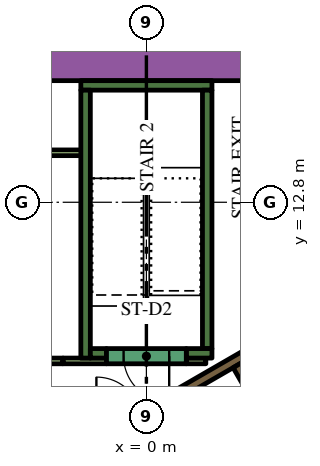
"""IFC4 building model, lengths in metres.
Left out: names, types, materials, properties, quantities, classifications, styles, units other than length and angle.
Written with IfcOpenShell. Run it as: python <this file> out.ifc"""

import sys

from ifc_helpers import new_model, si_unit, direction, frame, frame_2d, origin, place, context, subcontext, project, spatial, rectangle, extrude, element, fill, save


model = new_model("IFC4")
c1 = context("Model", 3, precision=1e-05, world=origin(), true_north=direction((0.0, 1.0)))
c2 = subcontext(c1, "Body", "Model", "MODEL_VIEW")
j1 = project(units=[si_unit("LENGTHUNIT", "METRE"), si_unit("PLANEANGLEUNIT", "RADIAN")], contexts=[c1])
p1 = place(None, origin())
s1 = spatial("IfcSite", under=j1, at=p1, CompositionType="ELEMENT")
p2 = place(p1, origin())
s2 = spatial("IfcBuilding", under=s1, at=p2, CompositionType="ELEMENT")
p3 = place(p2, frame((0.0, 0.0, 87.6)))
s3 = spatial("IfcBuildingStorey", under=s2, at=p3, CompositionType="ELEMENT", Elevation=87.6)
p4 = place(p3, frame((-4.224, 16.45, 0.0), z_axis=(0.0, 0.0, 1.0), x_axis=(1.0, 0.0, 0.0)))
e1 = element("IfcWall", 1, at=p4, inside=s3, PredefinedType="SOLIDWALL", context=c2, shape_type="SweptSolid", body=[
    extrude(rectangle(XDim=9.488, YDim=0.9, at=frame_2d((4.744, 0.0))), origin(), (0.0, 0.0, 1.0), 3.9),
])
p5 = place(p3, frame((-1.725, 15.875, 0.0), z_axis=(0.0, 0.0, 1.0), x_axis=(1.0, 0.0, 0.0)))
e2 = element("IfcWall", 2, at=p5, inside=s3, PredefinedType="SOLIDWALL", context=c2, shape_type="SweptSolid", body=[
    extrude(rectangle(XDim=3.45, YDim=0.25, at=frame_2d((1.725, 0.0))), origin(), (0.0, 0.0, 1.0), 3.9),
])
p6 = place(p3, frame((1.6, 8.95, 0.0), z_axis=(0.0, 0.0, 1.0), x_axis=(0.0, 1.0, 0.0)))
e3 = element("IfcWall", 3, at=p6, inside=s3, PredefinedType="SOLIDWALL", context=c2, shape_type="SweptSolid", body=[
    extrude(rectangle(XDim=6.8, YDim=0.25, at=frame_2d((3.4, 0.0))), origin(), (0.0, 0.0, 1.0), 3.9),
])
p7 = place(p3, frame((1.05, 8.825, 0.0), z_axis=(0.0, 0.0, 1.0), x_axis=(1.0, 0.0, 0.0)))
e4 = element("IfcWall", 4, at=p7, inside=s3, PredefinedType="SOLIDWALL", context=c2, shape_type="SweptSolid", body=[
    extrude(rectangle(XDim=0.675, YDim=0.25, at=frame_2d((0.337, 0.0))), origin(), (0.0, 0.0, 1.0), 3.9),
])
p8 = place(p3, frame((-1.6, 8.7, 0.0), z_axis=(0.0, 0.0, 1.0), x_axis=(0.0, 1.0, 0.0)))
e5 = element("IfcWall", 5, at=p8, inside=s3, PredefinedType="SOLIDWALL", context=c2, shape_type="SweptSolid", body=[
    extrude(rectangle(XDim=7.05, YDim=0.25, at=frame_2d((3.525, 0.0))), origin(), (0.0, 0.0, 1.0), 3.9),
])
p9 = place(p3, frame((-1.475, 8.825, 0.0), z_axis=(0.0, 0.0, 1.0), x_axis=(1.0, 0.0, 0.0)))
e6 = element("IfcWall", 6, at=p9, inside=s3, PredefinedType="SOLIDWALL", context=c2, shape_type="SweptSolid", body=[
    extrude(rectangle(XDim=0.425, YDim=0.25, at=frame_2d((0.212, 0.0))), origin(), (0.0, 0.0, 1.0), 3.9),
])
p10 = place(p3, frame((0.314, 7.456, 0.0), z_axis=(0.0, 0.0, 1.0), x_axis=(0.866013897511, 0.50001992892, 0.0)))
e7 = element("IfcWall", 7, at=p10, inside=s3, PredefinedType="SOLIDWALL", context=c2, shape_type="SweptSolid", body=[
    extrude(rectangle(XDim=3.268, YDim=0.25, at=frame_2d((1.634, 0.0))), origin(), (0.0, 0.0, 1.0), 3.9),
])
p11 = place(p3, frame((-2.871, 14.102, 0.0), z_axis=(0.0, 0.0, 1.0), x_axis=(1.0, 0.0, 0.0)))
e8 = element("IfcWall", 8, at=p11, inside=s3, PredefinedType="PARTITIONING", context=c2, shape_type="SweptSolid", body=[
    extrude(rectangle(XDim=1.196, YDim=0.15, at=frame_2d((0.598, 0.0))), origin(), (0.0, 0.0, 1.0), 2.75),
])
p12 = place(p3, frame((-2.196, 8.625, 0.0), z_axis=(0.0, 0.0, 1.0), x_axis=(1.0, 0.0, 0.0)))
e9 = element("IfcWall", 9, at=p12, inside=s3, PredefinedType="PARTITIONING", context=c2, shape_type="SweptSolid", body=[
    extrude(rectangle(XDim=1.146, YDim=0.15, at=frame_2d((0.573, 0.0))), origin(), (0.0, 0.0, 1.0), 2.75),
])
p13 = place(p3, frame((1.05, 8.625, 0.0), z_axis=(0.0, 0.0, 1.0), x_axis=(1.0, 0.0, 0.0)))
e10 = element("IfcWall", 10, at=p13, inside=s3, PredefinedType="PARTITIONING", context=c2, shape_type="SweptSolid", body=[
    extrude(rectangle(XDim=0.514, YDim=0.15, at=frame_2d((0.257, 0.0))), origin(), (0.0, 0.0, 1.0), 2.75),
])
p14 = place(p3, frame((8.565, -2.185, 0.0), z_axis=(0.0, 0.0, 1.0), x_axis=(-0.499997954832, 0.866026584559, 0.0)))
e11 = element("IfcWall", 11, at=p14, inside=s3, PredefinedType="SOLIDWALL", context=c2, shape_type="SweptSolid", body=[
    extrude(rectangle(XDim=12.35, YDim=0.25, at=frame_2d((6.175, 0.0))), origin(), (0.0, 0.0, 1.0), 3.9),
])
p15 = place(p14, frame((5.725, 0.0, 0.0)))
e12 = element("IfcOpeningElement", 12, at=p15, cuts=e11, PredefinedType="OPENING", context=c2, shape_type="SweptSolid", body=[
    extrude(rectangle(XDim=0.9, YDim=2.1, at=frame_2d((0.45, 1.05))), frame((0.0, 0.135, 0.0), z_axis=(0.0, -1.0, 0.0), x_axis=(1.0, 0.0, 0.0)), (0.0, 0.0, 1.0), 0.27),
])
p16 = place(p3, frame((1.05, 8.75, 0.0), z_axis=(0.0, 0.0, 1.0), x_axis=(-1.0, 0.0, 0.0)))
e13 = element("IfcWall", 13, at=p16, inside=s3, PredefinedType="SOLIDWALL", context=c2, shape_type="SweptSolid", body=[
    extrude(rectangle(XDim=2.1, YDim=0.4, at=frame_2d((1.05, 0.0))), origin(), (0.0, 0.0, 1.0), 3.9),
])
p17 = place(p16, frame((0.45, 0.0, 0.0)))
e14 = element("IfcOpeningElement", 14, at=p17, cuts=e13, PredefinedType="OPENING", context=c2, shape_type="SweptSolid", body=[
    extrude(rectangle(XDim=1.2, YDim=2.1, at=frame_2d((0.6, 1.05))), frame((0.0, 0.21, 0.0), z_axis=(0.0, -1.0, 0.0), x_axis=(1.0, 0.0, 0.0)), (0.0, 0.0, 1.0), 0.42),
])
p18 = place(p3, frame((-2.196, 8.625, 0.0), z_axis=(0.0, 0.0, 1.0), x_axis=(-1.0, 0.0, 0.0)))
e15 = element("IfcWall", 15, at=p18, inside=s3, PredefinedType="PARTITIONING", context=c2, shape_type="SweptSolid", body=[
    extrude(rectangle(XDim=1.8, YDim=0.15, at=frame_2d((0.9, 0.0))), origin(), (0.0, 0.0, 1.0), 2.75),
])
p19 = place(p18, frame((0.45, 0.0, 0.0)))
e16 = element("IfcOpeningElement", 16, at=p19, cuts=e15, PredefinedType="OPENING", context=c2, shape_type="SweptSolid", body=[
    extrude(rectangle(XDim=0.9, YDim=2.1, at=frame_2d((0.45, 1.05))), frame((0.0, 0.085, 0.0), z_axis=(0.0, -1.0, 0.0), x_axis=(1.0, 0.0, 0.0)), (0.0, 0.0, 1.0), 0.17),
])
p20 = place(p17, origin())
e17 = element("IfcDoor", 17, at=p20, inside=s3, OperationType="SINGLE_SWING_LEFT", PredefinedType="DOOR", context=c2, shape_type="SweptSolid", body=[
    extrude(rectangle(XDim=1.2, YDim=2.1, at=frame_2d((0.6, 1.05))), frame((0.0, 0.025, 0.0), z_axis=(0.0, -1.0, 0.0), x_axis=(1.0, 0.0, 0.0)), (0.0, 0.0, 1.0), 0.05),
])
fill(e14, e17)
save(model, sys.argv[1])
